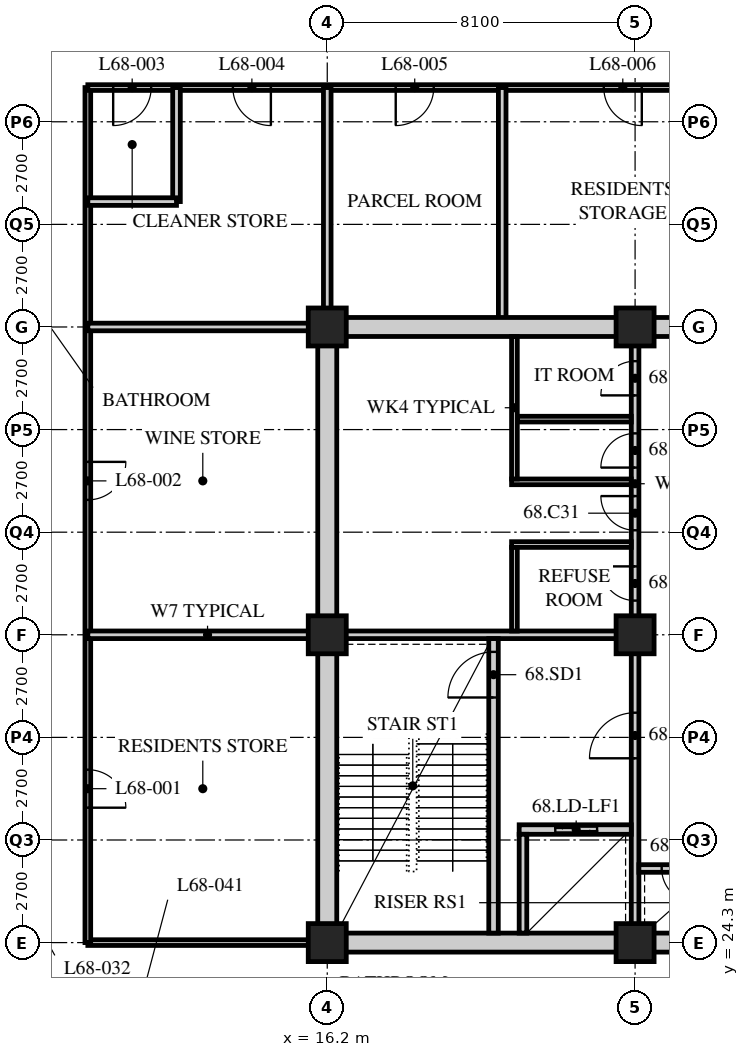
"""IFC4 building model, lengths in metres.
Left out: names, types, materials, properties, quantities, classifications, styles, units other than length and angle.
Written with IfcOpenShell. Run it as: python <this file> out.ifc"""

import sys

from ifc_helpers import new_model, si_unit, direction, frame, frame_2d, origin, origin_2d, place, context, subcontext, project, spatial, rectangle, hollow_rectangle, extrude, element, fill, save


model = new_model("IFC4")
c1 = context("Model", 3, precision=1e-05, world=origin(), true_north=direction((0.0, 1.0)))
c2 = subcontext(c1, "Body", "Model", "MODEL_VIEW")
j1 = project(units=[si_unit("LENGTHUNIT", "METRE"), si_unit("PLANEANGLEUNIT", "RADIAN")], contexts=[c1])
p1 = place(None, origin())
s1 = spatial("IfcSite", under=j1, at=p1, CompositionType="ELEMENT")
p2 = place(p1, origin())
s2 = spatial("IfcBuilding", under=s1, at=p2, CompositionType="ELEMENT")
p3 = place(p2, frame((0.0, 0.0, 265.8)))
s3 = spatial("IfcBuildingStorey", under=s2, at=p3, CompositionType="ELEMENT", Elevation=265.8)
for number, where, z_axis, x_axis in (
    (1, (16.2, 24.3, 0.0), (0.0, 0.0, 1.0), (1.0, 0.0, 0.0)),
    (2, (16.2, 32.4, 0.0), (0.0, 0.0, 1.0), (1.0, 0.0, 0.0)),
    (3, (16.2, 40.5, 0.0), (0.0, 0.0, 1.0), (1.0, 0.0, 0.0)),
    (4, (24.3, 24.3, 0.0), (0.0, 0.0, 1.0), (1.0, 0.0, 0.0)),
    (5, (24.3, 32.4, 0.0), (0.0, 0.0, 1.0), (1.0, 0.0, 0.0)),
    (6, (24.3, 40.5, 0.0), (0.0, 0.0, 1.0), (1.0, 0.0, 0.0)),
):
    element("IfcColumn", number, at=place(p3, frame(where, z_axis=z_axis, x_axis=x_axis)), inside=s3, PredefinedType="COLUMN", context=c2, shape_type="SweptSolid", body=[
        extrude(hollow_rectangle(XDim=1.0, YDim=1.0, WallThickness=0.1, at=origin_2d()), origin(), (0.0, 0.0, 1.0), 3.9),
    ])
p4 = place(p3, frame((16.0, 24.3, 0.0), z_axis=(0.0, 0.0, 1.0), x_axis=(-1.0, 0.0, 0.0)))
e7 = element("IfcWall", 7, at=p4, inside=s3, PredefinedType="PARTITIONING", context=c2, shape_type="SweptSolid", body=[
    extrude(rectangle(XDim=6.1, YDim=0.15, at=frame_2d((3.05, 0.0))), origin(), (0.0, 0.0, 1.0), 3.078),
])
p5 = place(p3, frame((9.9, 24.3, 0.0), z_axis=(0.0, 0.0, 1.0), x_axis=(0.0, 1.0, 0.0)))
e8 = element("IfcWall", 8, at=p5, inside=s3, PredefinedType="PARTITIONING", context=c2, shape_type="SweptSolid", body=[
    extrude(rectangle(XDim=22.5, YDim=0.15, at=frame_2d((11.25, 0.0))), origin(), (0.0, 0.0, 1.0), 3.69),
])
p6 = place(p5, frame((3.55, 0.0, 0.0)))
e9 = element("IfcOpeningElement", 9, at=p6, cuts=e8, PredefinedType="OPENING", context=c2, shape_type="SweptSolid", body=[
    extrude(rectangle(XDim=1.0, YDim=2.1, at=frame_2d((0.5, 1.05))), frame((0.0, 0.085, 0.0), z_axis=(0.0, -1.0, 0.0), x_axis=(1.0, 0.0, 0.0)), (0.0, 0.0, 1.0), 0.17),
])
p7 = place(p5, frame((11.65, 0.0, 0.0)))
e10 = element("IfcOpeningElement", 10, at=p7, cuts=e8, PredefinedType="OPENING", context=c2, shape_type="SweptSolid", body=[
    extrude(rectangle(XDim=1.0, YDim=2.1, at=frame_2d((0.5, 1.05))), frame((0.0, 0.085, 0.0), z_axis=(0.0, -1.0, 0.0), x_axis=(1.0, 0.0, 0.0)), (0.0, 0.0, 1.0), 0.17),
])
p8 = place(p3, frame((9.9, 46.8, 0.0), z_axis=(0.0, 0.0, 1.0), x_axis=(1.0, 0.0, 0.0)))
e11 = element("IfcWall", 11, at=p8, inside=s3, PredefinedType="PARTITIONING", context=c2, shape_type="SweptSolid", body=[
    extrude(rectangle(XDim=17.24, YDim=0.15, at=frame_2d((8.62, 0.0))), origin(), (0.0, 0.0, 1.0), 3.69),
])
p9 = place(p8, frame((0.667, 0.0, 0.0)))
e12 = element("IfcOpeningElement", 12, at=p9, cuts=e11, PredefinedType="OPENING", context=c2, shape_type="SweptSolid", body=[
    extrude(rectangle(XDim=1.0, YDim=2.1, at=frame_2d((0.5, 1.05))), frame((0.0, 0.085, 0.0), z_axis=(0.0, -1.0, 0.0), x_axis=(1.0, 0.0, 0.0)), (0.0, 0.0, 1.0), 0.17),
])
p10 = place(p8, frame((3.817, 0.0, 0.0)))
e13 = element("IfcOpeningElement", 13, at=p10, cuts=e11, PredefinedType="OPENING", context=c2, shape_type="SweptSolid", body=[
    extrude(rectangle(XDim=1.0, YDim=2.1, at=frame_2d((0.5, 1.05))), frame((0.0, 0.085, 0.0), z_axis=(0.0, -1.0, 0.0), x_axis=(1.0, 0.0, 0.0)), (0.0, 0.0, 1.0), 0.17),
])
p11 = place(p8, frame((8.102, 0.0, 0.0)))
e14 = element("IfcOpeningElement", 14, at=p11, cuts=e11, PredefinedType="OPENING", context=c2, shape_type="SweptSolid", body=[
    extrude(rectangle(XDim=1.0, YDim=2.1, at=frame_2d((0.5, 1.05))), frame((0.0, 0.085, 0.0), z_axis=(0.0, -1.0, 0.0), x_axis=(1.0, 0.0, 0.0)), (0.0, 0.0, 1.0), 0.17),
])
p12 = place(p8, frame((13.577, 0.0, 0.0)))
e15 = element("IfcOpeningElement", 15, at=p12, cuts=e11, PredefinedType="OPENING", context=c2, shape_type="SweptSolid", body=[
    extrude(rectangle(XDim=1.0, YDim=2.1, at=frame_2d((0.5, 1.05))), frame((0.0, 0.085, 0.0), z_axis=(0.0, -1.0, 0.0), x_axis=(1.0, 0.0, 0.0)), (0.0, 0.0, 1.0), 0.17),
])
for number, where, z_axis, x_axis in (
    (16, (9.9, 32.4, 0.0), (0.0, 0.0, 1.0), (1.0, 0.0, 0.0)),
    (17, (16.2, 40.5, 0.0), (0.0, 0.0, 1.0), (0.0, 1.0, 0.0)),
):
    element("IfcWall", number, at=place(p3, frame(where, z_axis=z_axis, x_axis=x_axis)), inside=s3, PredefinedType="SOLIDWALL", context=c2, shape_type="SweptSolid", body=[
        extrude(rectangle(XDim=6.3, YDim=0.2, at=frame_2d((3.15, 0.0))), origin(), (0.0, 0.0, 1.0), 3.078),
    ])
p13 = place(p3, frame((12.233, 46.8, 0.0), z_axis=(0.0, 0.0, 1.0), x_axis=(0.0, -1.0, 0.0)))
e18 = element("IfcWall", 18, at=p13, inside=s3, PredefinedType="SOLIDWALL", context=c2, shape_type="SweptSolid", body=[
    extrude(rectangle(XDim=3.0, YDim=0.2, at=frame_2d((1.5, 0.0))), origin(), (0.0, 0.0, 1.0), 3.69),
])
p14 = place(p3, frame((9.9, 43.8, 0.0), z_axis=(0.0, 0.0, 1.0), x_axis=(1.0, 0.0, 0.0)))
e19 = element("IfcWall", 19, at=p14, inside=s3, PredefinedType="SOLIDWALL", context=c2, shape_type="SweptSolid", body=[
    extrude(rectangle(XDim=2.333, YDim=0.2, at=frame_2d((1.167, 0.0))), origin(), (0.0, 0.0, 1.0), 3.69),
])
p15 = place(p3, frame((20.803, 46.8, 0.0), z_axis=(0.0, 0.0, 1.0), x_axis=(0.0, -1.0, 0.0)))
e20 = element("IfcWall", 20, at=p15, inside=s3, PredefinedType="SOLIDWALL", context=c2, shape_type="SweptSolid", body=[
    extrude(rectangle(XDim=6.3, YDim=0.2, at=frame_2d((3.15, 0.0))), origin(), (0.0, 0.0, 1.0), 3.69),
])
p16 = place(p3, frame((9.9, 40.5, 0.0), z_axis=(0.0, 0.0, 1.0), x_axis=(1.0, 0.0, 0.0)))
e21 = element("IfcWall", 21, at=p16, inside=s3, PredefinedType="SOLIDWALL", context=c2, shape_type="SweptSolid", body=[
    extrude(rectangle(XDim=6.3, YDim=0.2, at=frame_2d((3.15, 0.0))), origin(), (0.0, 0.0, 1.0), 3.078),
])
p17 = place(p3, frame((15.95, 24.3, 0.0), z_axis=(0.0, 0.0, 1.0), x_axis=(1.0, 0.0, 0.0)))
e22 = element("IfcWall", 22, at=p17, inside=s3, PredefinedType="SOLIDWALL", context=c2, shape_type="SweptSolid", body=[
    extrude(rectangle(XDim=24.55, YDim=0.5, at=frame_2d((12.275, 0.0))), origin(), (0.0, 0.0, 1.0), 3.04),
])
p18 = place(p17, frame((11.5, 0.0, 0.0)))
e23 = element("IfcOpeningElement", 23, at=p18, cuts=e22, PredefinedType="OPENING", context=c2, shape_type="SweptSolid", body=[
    extrude(rectangle(XDim=1.8, YDim=2.4, at=frame_2d((0.9, 1.2))), frame((0.0, 0.26, 0.0), z_axis=(0.0, -1.0, 0.0), x_axis=(1.0, 0.0, 0.0)), (0.0, 0.0, 1.0), 0.52),
])
p19 = place(p3, frame((15.95, 40.5, 0.0), z_axis=(0.0, 0.0, 1.0), x_axis=(1.0, 0.0, 0.0)))
e24 = element("IfcWall", 24, at=p19, inside=s3, PredefinedType="SOLIDWALL", context=c2, shape_type="SweptSolid", body=[
    extrude(rectangle(XDim=24.55, YDim=0.5, at=frame_2d((12.275, 0.0))), origin(), (0.0, 0.0, 1.0), 3.04),
])
p20 = place(p19, frame((11.5, 0.0, 0.0)))
e25 = element("IfcOpeningElement", 25, at=p20, cuts=e24, PredefinedType="OPENING", context=c2, shape_type="SweptSolid", body=[
    extrude(rectangle(XDim=1.8, YDim=2.4, at=frame_2d((0.9, 1.2))), frame((0.0, 0.26, 0.0), z_axis=(0.0, -1.0, 0.0), x_axis=(1.0, 0.0, 0.0)), (0.0, 0.0, 1.0), 0.52),
])
p21 = place(p3, frame((16.2, 24.55, 0.0), z_axis=(0.0, 0.0, 1.0), x_axis=(0.0, 1.0, 0.0)))
e26 = element("IfcWall", 26, at=p21, inside=s3, PredefinedType="SOLIDWALL", context=c2, shape_type="SweptSolid", body=[
    extrude(rectangle(XDim=15.7, YDim=0.5, at=frame_2d((7.85, 0.0))), origin(), (0.0, 0.0, 1.0), 3.078),
])
p22 = place(p3, frame((16.45, 32.4, 0.0), z_axis=(0.0, 0.0, 1.0), x_axis=(1.0, 0.0, 0.0)))
e27 = element("IfcWall", 27, at=p22, inside=s3, PredefinedType="SOLIDWALL", context=c2, shape_type="SweptSolid", body=[
    extrude(rectangle(XDim=7.95, YDim=0.2, at=frame_2d((3.975, 0.0))), origin(), (0.0, 0.0, 1.0), 3.078),
])
p23 = place(p3, frame((24.3, 24.55, 0.0), z_axis=(0.0, 0.0, 1.0), x_axis=(0.0, 1.0, 0.0)))
e28 = element("IfcWall", 28, at=p23, inside=s3, PredefinedType="SOLIDWALL", context=c2, shape_type="SweptSolid", body=[
    extrude(rectangle(XDim=7.75, YDim=0.2, at=frame_2d((3.875, 0.0))), origin(), (0.0, 0.0, 1.0), 3.078),
])
p24 = place(p23, frame((4.6, 0.0, 0.0)))
e29 = element("IfcOpeningElement", 29, at=p24, cuts=e28, PredefinedType="OPENING", context=c2, shape_type="SweptSolid", body=[
    extrude(rectangle(XDim=1.2, YDim=2.1, at=frame_2d((0.6, 1.05))), frame((0.0, 0.11, 0.0), z_axis=(0.0, -1.0, 0.0), x_axis=(1.0, 0.0, 0.0)), (0.0, 0.0, 1.0), 0.22),
])
p25 = place(p3, frame((20.575, 24.55, 0.0), z_axis=(0.0, 0.0, 1.0), x_axis=(0.0, 1.0, 0.0)))
e30 = element("IfcWall", 30, at=p25, inside=s3, PredefinedType="SOLIDWALL", context=c2, shape_type="SweptSolid", body=[
    extrude(rectangle(XDim=7.75, YDim=0.25, at=frame_2d((3.875, 0.0))), origin(), (0.0, 0.0, 1.0), 3.69),
])
p26 = place(p25, frame((6.2, 0.0, 0.0)))
e31 = element("IfcOpeningElement", 31, at=p26, cuts=e30, PredefinedType="OPENING", context=c2, shape_type="SweptSolid", body=[
    extrude(rectangle(XDim=1.2, YDim=2.1, at=frame_2d((0.6, 1.05))), frame((0.0, 0.135, 0.0), z_axis=(0.0, -1.0, 0.0), x_axis=(1.0, 0.0, 0.0)), (0.0, 0.0, 1.0), 0.27),
])
p27 = place(p3, frame((21.25, 27.275, 0.0), z_axis=(0.0, 0.0, 1.0), x_axis=(1.0, 0.0, 0.0)))
e32 = element("IfcWall", 32, at=p27, inside=s3, PredefinedType="SOLIDWALL", context=c2, shape_type="SweptSolid", body=[
    extrude(rectangle(XDim=2.95, YDim=0.25, at=frame_2d((1.475, 0.0))), origin(), (0.0, 0.0, 1.0), 3.69),
])
p28 = place(p27, frame((0.95, 0.0, 0.0)))
e33 = element("IfcOpeningElement", 33, at=p28, cuts=e32, PredefinedType="OPENING", context=c2, shape_type="SweptSolid", body=[
    extrude(rectangle(XDim=1.1, YDim=2.4, at=frame_2d((0.55, 1.2))), frame((0.0, 0.135, 0.0), z_axis=(0.0, -1.0, 0.0), x_axis=(1.0, 0.0, 0.0)), (0.0, 0.0, 1.0), 0.27),
])
p29 = place(p3, frame((21.35, 24.55, 0.0), z_axis=(0.0, 0.0, 1.0), x_axis=(0.0, 1.0, 0.0)))
e34 = element("IfcWall", 34, at=p29, inside=s3, PredefinedType="SOLIDWALL", context=c2, shape_type="SweptSolid", body=[
    extrude(rectangle(XDim=2.6, YDim=0.2, at=frame_2d((1.3, 0.0))), origin(), (0.0, 0.0, 1.0), 3.69),
])
p30 = place(p3, frame((24.4, 26.25, 0.0), z_axis=(0.0, 0.0, 1.0), x_axis=(1.0, 0.0, 0.0)))
e35 = element("IfcWall", 35, at=p30, inside=s3, PredefinedType="SOLIDWALL", context=c2, shape_type="SweptSolid", body=[
    extrude(rectangle(XDim=2.15, YDim=0.2, at=frame_2d((1.075, 0.0))), origin(), (0.0, 0.0, 1.0), 3.69),
])
p31 = place(p30, frame((0.6, 0.0, 0.0)))
e36 = element("IfcOpeningElement", 36, at=p31, cuts=e35, PredefinedType="OPENING", context=c2, shape_type="SweptSolid", body=[
    extrude(rectangle(XDim=0.9, YDim=2.1, at=frame_2d((0.45, 1.05))), frame((0.0, 0.11, 0.0), z_axis=(0.0, -1.0, 0.0), x_axis=(1.0, 0.0, 0.0)), (0.0, 0.0, 1.0), 0.22),
])
p32 = place(p3, frame((24.3, 32.5, 0.0), z_axis=(0.0, 0.0, 1.0), x_axis=(0.0, 1.0, 0.0)))
e37 = element("IfcWall", 37, at=p32, inside=s3, PredefinedType="PARTITIONING", context=c2, shape_type="SweptSolid", body=[
    extrude(rectangle(XDim=7.75, YDim=0.2, at=frame_2d((3.875, 0.0))), origin(), (0.0, 0.0, 1.0), 3.078),
])
p33 = place(p32, frame((0.8, 0.0, 0.0)))
e38 = element("IfcOpeningElement", 38, at=p33, cuts=e37, PredefinedType="OPENING", context=c2, shape_type="SweptSolid", body=[
    extrude(rectangle(XDim=0.9, YDim=2.1, at=frame_2d((0.45, 1.05))), frame((0.0, 0.11, 0.0), z_axis=(0.0, -1.0, 0.0), x_axis=(1.0, 0.0, 0.0)), (0.0, 0.0, 1.0), 0.22),
])
p34 = place(p32, frame((2.65, 0.0, 0.0)))
e39 = element("IfcOpeningElement", 39, at=p34, cuts=e37, PredefinedType="OPENING", context=c2, shape_type="SweptSolid", body=[
    extrude(rectangle(XDim=0.9, YDim=2.1, at=frame_2d((0.45, 1.05))), frame((0.0, 0.11, 0.0), z_axis=(0.0, -1.0, 0.0), x_axis=(1.0, 0.0, 0.0)), (0.0, 0.0, 1.0), 0.22),
])
p35 = place(p32, frame((4.3, 0.0, 0.0)))
e40 = element("IfcOpeningElement", 40, at=p35, cuts=e37, PredefinedType="OPENING", context=c2, shape_type="SweptSolid", body=[
    extrude(rectangle(XDim=0.9, YDim=2.1, at=frame_2d((0.45, 1.05))), frame((0.0, 0.11, 0.0), z_axis=(0.0, -1.0, 0.0), x_axis=(1.0, 0.0, 0.0)), (0.0, 0.0, 1.0), 0.22),
])
p36 = place(p32, frame((6.2, 0.0, 0.0)))
e41 = element("IfcOpeningElement", 41, at=p36, cuts=e37, PredefinedType="OPENING", context=c2, shape_type="SweptSolid", body=[
    extrude(rectangle(XDim=0.9, YDim=2.1, at=frame_2d((0.45, 1.05))), frame((0.0, 0.11, 0.0), z_axis=(0.0, -1.0, 0.0), x_axis=(1.0, 0.0, 0.0)), (0.0, 0.0, 1.0), 0.22),
])
for number, where, z_axis, x_axis in (
    (42, (21.05, 34.775, 0.0), (0.0, 0.0, 1.0), (1.0, 0.0, 0.0)),
    (43, (21.05, 36.425, 0.0), (0.0, 0.0, 1.0), (1.0, 0.0, 0.0)),
):
    element("IfcWall", number, at=place(p3, frame(where, z_axis=z_axis, x_axis=x_axis)), inside=s3, PredefinedType="PARTITIONING", context=c2, shape_type="SweptSolid", body=[
        extrude(rectangle(XDim=3.15, YDim=0.15, at=frame_2d((1.575, 0.0))), origin(), (0.0, 0.0, 1.0), 3.69),
    ])
p37 = place(p3, frame((21.2, 38.075, 0.0), z_axis=(0.0, 0.0, 1.0), x_axis=(1.0, 0.0, 0.0)))
e44 = element("IfcWall", 44, at=p37, inside=s3, PredefinedType="PARTITIONING", context=c2, shape_type="SweptSolid", body=[
    extrude(rectangle(XDim=3.0, YDim=0.15, at=frame_2d((1.5, 0.0))), origin(), (0.0, 0.0, 1.0), 3.69),
])
p38 = place(p3, frame((21.125, 32.5, 0.0), z_axis=(0.0, 0.0, 1.0), x_axis=(0.0, 1.0, 0.0)))
e45 = element("IfcWall", 45, at=p38, inside=s3, PredefinedType="PARTITIONING", context=c2, shape_type="SweptSolid", body=[
    extrude(rectangle(XDim=2.2, YDim=0.15, at=frame_2d((1.1, 0.0))), origin(), (0.0, 0.0, 1.0), 3.69),
])
p39 = place(p3, frame((21.125, 36.5, 0.0), z_axis=(0.0, 0.0, 1.0), x_axis=(0.0, 1.0, 0.0)))
e46 = element("IfcWall", 46, at=p39, inside=s3, PredefinedType="PARTITIONING", context=c2, shape_type="SweptSolid", body=[
    extrude(rectangle(XDim=3.75, YDim=0.15, at=frame_2d((1.875, 0.0))), origin(), (0.0, 0.0, 1.0), 3.69),
])
p40 = place(p6, origin())
e47 = element("IfcDoor", 47, at=p40, inside=s3, OperationType="SINGLE_SWING_RIGHT", PredefinedType="DOOR", context=c2, shape_type="SweptSolid", body=[
    extrude(rectangle(XDim=1.0, YDim=2.1, at=frame_2d((0.5, 1.05))), frame((0.0, 0.025, 0.0), z_axis=(0.0, -1.0, 0.0), x_axis=(1.0, 0.0, 0.0)), (0.0, 0.0, 1.0), 0.05),
])
fill(e9, e47)
p41 = place(p7, origin())
e48 = element("IfcDoor", 48, at=p41, inside=s3, OperationType="SINGLE_SWING_LEFT", PredefinedType="DOOR", context=c2, shape_type="SweptSolid", body=[
    extrude(rectangle(XDim=1.0, YDim=2.1, at=frame_2d((0.5, 1.05))), frame((0.0, 0.025, 0.0), z_axis=(0.0, -1.0, 0.0), x_axis=(1.0, 0.0, 0.0)), (0.0, 0.0, 1.0), 0.05),
])
fill(e10, e48)
p42 = place(p9, origin())
e49 = element("IfcDoor", 49, at=p42, inside=s3, OperationType="SINGLE_SWING_RIGHT", PredefinedType="DOOR", context=c2, shape_type="SweptSolid", body=[
    extrude(rectangle(XDim=1.0, YDim=2.1, at=frame_2d((0.5, 1.05))), frame((0.0, 0.025, 0.0), z_axis=(0.0, -1.0, 0.0), x_axis=(1.0, 0.0, 0.0)), (0.0, 0.0, 1.0), 0.05),
])
fill(e12, e49)
p43 = place(p10, origin())
e50 = element("IfcDoor", 50, at=p43, inside=s3, OperationType="SINGLE_SWING_LEFT", PredefinedType="DOOR", context=c2, shape_type="SweptSolid", body=[
    extrude(rectangle(XDim=1.0, YDim=2.1, at=frame_2d((0.5, 1.05))), frame((0.0, 0.025, 0.0), z_axis=(0.0, -1.0, 0.0), x_axis=(1.0, 0.0, 0.0)), (0.0, 0.0, 1.0), 0.05),
])
fill(e13, e50)
p44 = place(p11, origin())
e51 = element("IfcDoor", 51, at=p44, inside=s3, OperationType="SINGLE_SWING_RIGHT", PredefinedType="DOOR", context=c2, shape_type="SweptSolid", body=[
    extrude(rectangle(XDim=1.0, YDim=2.1, at=frame_2d((0.5, 1.05))), frame((0.0, 0.025, 0.0), z_axis=(0.0, -1.0, 0.0), x_axis=(1.0, 0.0, 0.0)), (0.0, 0.0, 1.0), 0.05),
])
fill(e14, e51)
p45 = place(p12, origin())
e52 = element("IfcDoor", 52, at=p45, inside=s3, OperationType="SINGLE_SWING_LEFT", PredefinedType="DOOR", context=c2, shape_type="SweptSolid", body=[
    extrude(rectangle(XDim=1.0, YDim=2.1, at=frame_2d((0.5, 1.05))), frame((0.0, 0.025, 0.0), z_axis=(0.0, -1.0, 0.0), x_axis=(1.0, 0.0, 0.0)), (0.0, 0.0, 1.0), 0.05),
])
fill(e15, e52)
p46 = place(p33, origin())
e53 = element("IfcDoor", 53, at=p46, inside=s3, OperationType="SINGLE_SWING_RIGHT", PredefinedType="DOOR", context=c2, shape_type="SweptSolid", body=[
    extrude(rectangle(XDim=0.9, YDim=2.1, at=frame_2d((0.45, 1.05))), frame((0.0, 0.025, 0.0), z_axis=(0.0, -1.0, 0.0), x_axis=(1.0, 0.0, 0.0)), (0.0, 0.0, 1.0), 0.05),
])
fill(e38, e53)
p47 = place(p34, origin())
e54 = element("IfcDoor", 54, at=p47, inside=s3, OperationType="SINGLE_SWING_RIGHT", PredefinedType="DOOR", context=c2, shape_type="SweptSolid", body=[
    extrude(rectangle(XDim=0.9, YDim=2.1, at=frame_2d((0.45, 1.05))), frame((0.0, 0.025, 0.0), z_axis=(0.0, -1.0, 0.0), x_axis=(1.0, 0.0, 0.0)), (0.0, 0.0, 1.0), 0.05),
])
fill(e39, e54)
p48 = place(p35, origin())
e55 = element("IfcDoor", 55, at=p48, inside=s3, OperationType="SINGLE_SWING_LEFT", PredefinedType="DOOR", context=c2, shape_type="SweptSolid", body=[
    extrude(rectangle(XDim=0.9, YDim=2.1, at=frame_2d((0.45, 1.05))), frame((0.0, 0.025, 0.0), z_axis=(0.0, -1.0, 0.0), x_axis=(1.0, 0.0, 0.0)), (0.0, 0.0, 1.0), 0.05),
])
fill(e40, e55)
p49 = place(p36, origin())
e56 = element("IfcDoor", 56, at=p49, inside=s3, OperationType="SINGLE_SWING_LEFT", PredefinedType="DOOR", context=c2, shape_type="SweptSolid", body=[
    extrude(rectangle(XDim=0.9, YDim=2.1, at=frame_2d((0.45, 1.05))), frame((0.0, 0.025, 0.0), z_axis=(0.0, -1.0, 0.0), x_axis=(1.0, 0.0, 0.0)), (0.0, 0.0, 1.0), 0.05),
])
fill(e41, e56)
p50 = place(p26, origin())
e57 = element("IfcDoor", 57, at=p50, inside=s3, OperationType="SINGLE_SWING_LEFT", PredefinedType="DOOR", context=c2, shape_type="SweptSolid", body=[
    extrude(rectangle(XDim=1.2, YDim=2.1, at=frame_2d((0.6, 1.05))), frame((0.0, 0.025, 0.0), z_axis=(0.0, -1.0, 0.0), x_axis=(1.0, 0.0, 0.0)), (0.0, 0.0, 1.0), 0.05),
])
fill(e31, e57)
p51 = place(p24, origin())
e58 = element("IfcDoor", 58, at=p51, inside=s3, OperationType="SINGLE_SWING_LEFT", PredefinedType="DOOR", context=c2, shape_type="SweptSolid", body=[
    extrude(rectangle(XDim=1.2, YDim=2.1, at=frame_2d((0.6, 1.05))), frame((0.0, 0.025, 0.0), z_axis=(0.0, -1.0, 0.0), x_axis=(1.0, 0.0, 0.0)), (0.0, 0.0, 1.0), 0.05),
])
fill(e29, e58)
p52 = place(p31, origin())
e59 = element("IfcDoor", 59, at=p52, inside=s3, OperationType="SINGLE_SWING_LEFT", PredefinedType="DOOR", context=c2, shape_type="SweptSolid", body=[
    extrude(rectangle(XDim=0.9, YDim=2.1, at=frame_2d((0.45, 1.05))), frame((0.0, 0.025, 0.0), z_axis=(0.0, -1.0, 0.0), x_axis=(1.0, 0.0, 0.0)), (0.0, 0.0, 1.0), 0.05),
])
fill(e36, e59)
p53 = place(p28, origin())
e60 = element("IfcDoor", 60, at=p53, inside=s3, OperationType="DOUBLE_DOOR_SLIDING", PredefinedType="DOOR", context=c2, shape_type="SweptSolid", body=[
    extrude(rectangle(XDim=1.1, YDim=2.4, at=frame_2d((0.55, 1.2))), frame((0.0, 0.025, 0.0), z_axis=(0.0, -1.0, 0.0), x_axis=(1.0, 0.0, 0.0)), (0.0, 0.0, 1.0), 0.05),
])
fill(e33, e60)
save(model, sys.argv[1])
